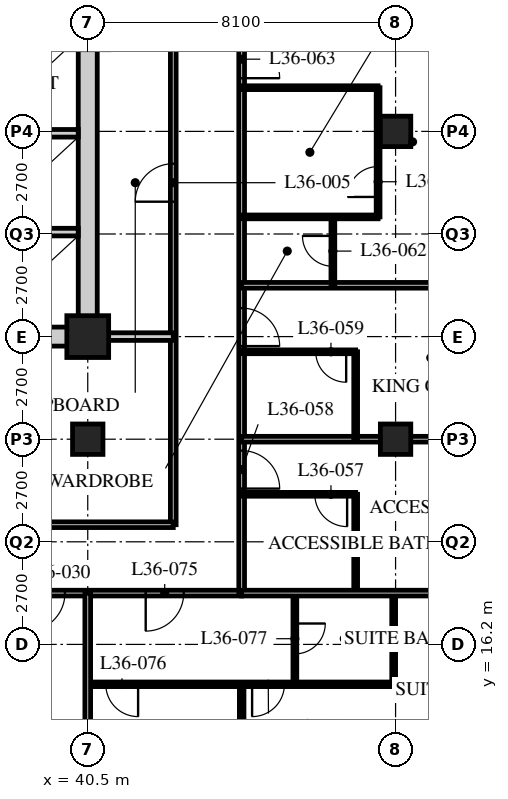
"""IFC4 building model, lengths in metres.
Left out: names, types, materials, properties, quantities, classifications, styles, units other than length and angle.
Written with IfcOpenShell. Run it as: python <this file> out.ifc"""

import sys

from ifc_helpers import new_model, si_unit, direction, frame, frame_2d, origin, origin_2d, place, context, subcontext, project, spatial, rectangle, hollow_rectangle, extrude, element, fill, save


model = new_model("IFC4")
c1 = context("Model", 3, precision=1e-05, world=origin(), true_north=direction((0.0, 1.0)))
c2 = subcontext(c1, "Body", "Model", "MODEL_VIEW")
j1 = project(units=[si_unit("LENGTHUNIT", "METRE"), si_unit("PLANEANGLEUNIT", "RADIAN")], contexts=[c1])
p1 = place(None, origin())
s1 = spatial("IfcSite", under=j1, at=p1, CompositionType="ELEMENT")
p2 = place(p1, origin())
s2 = spatial("IfcBuilding", under=s1, at=p2, CompositionType="ELEMENT")
p3 = place(p2, frame((0.0, 0.0, 140.8)))
s3 = spatial("IfcBuildingStorey", under=s2, at=p3, CompositionType="ELEMENT", Elevation=140.8)
p4 = place(p3, frame((40.5, 21.6, 0.0), z_axis=(0.0, 0.0, 1.0), x_axis=(1.0, 0.0, 0.0)))
e1 = element("IfcColumn", 1, at=p4, inside=s3, PredefinedType="COLUMN", context=c2, shape_type="SweptSolid", body=[
    extrude(hollow_rectangle(XDim=0.8, YDim=0.8, WallThickness=0.08, at=origin_2d()), origin(), (0.0, 0.0, 1.0), 3.4),
])
p5 = place(p3, frame((40.5, 24.3, 0.0), z_axis=(0.0, 0.0, 1.0), x_axis=(1.0, 0.0, 0.0)))
e2 = element("IfcColumn", 2, at=p5, inside=s3, PredefinedType="COLUMN", context=c2, shape_type="SweptSolid", body=[
    extrude(hollow_rectangle(XDim=1.1, YDim=1.1, WallThickness=0.1, at=origin_2d()), origin(), (0.0, 0.0, 1.0), 3.4),
])
for number, where, z_axis, x_axis in (
    (3, (48.6, 21.6, 0.0), (0.0, 0.0, 1.0), (1.0, 0.0, 0.0)),
    (4, (48.6, 29.7, 0.0), (0.0, 0.0, 1.0), (1.0, 0.0, 0.0)),
):
    element("IfcColumn", number, at=place(p3, frame(where, z_axis=z_axis, x_axis=x_axis)), inside=s3, PredefinedType="COLUMN", context=c2, shape_type="SweptSolid", body=[
        extrude(hollow_rectangle(XDim=0.8, YDim=0.8, WallThickness=0.08, at=origin_2d()), origin(), (0.0, 0.0, 1.0), 3.4),
    ])
p6 = place(p3, frame((8.1, 17.55, 0.0), z_axis=(0.0, 0.0, 1.0), x_axis=(1.0, 0.0, 0.0)))
e5 = element("IfcWall", 5, at=p6, inside=s3, PredefinedType="PARTITIONING", context=c2, shape_type="SweptSolid", body=[
    extrude(rectangle(XDim=36.45, YDim=0.15, at=frame_2d((18.225, 0.0))), origin(), (0.0, 0.0, 1.0), 3.19),
])
p7 = place(p6, frame((9.625, 0.0, 0.0)))
e6 = element("IfcOpeningElement", 6, at=p7, cuts=e5, PredefinedType="OPENING", context=c2, shape_type="SweptSolid", body=[
    extrude(rectangle(XDim=1.0, YDim=2.1, at=frame_2d((0.5, 1.05))), frame((0.0, 0.085, 0.0), z_axis=(0.0, -1.0, 0.0), x_axis=(1.0, 0.0, 0.0)), (0.0, 0.0, 1.0), 0.17),
])
p8 = place(p6, frame((18.1, 0.0, 0.0)))
e7 = element("IfcOpeningElement", 7, at=p8, cuts=e5, PredefinedType="OPENING", context=c2, shape_type="SweptSolid", body=[
    extrude(rectangle(XDim=1.0, YDim=2.1, at=frame_2d((0.5, 1.05))), frame((0.0, 0.085, 0.0), z_axis=(0.0, -1.0, 0.0), x_axis=(1.0, 0.0, 0.0)), (0.0, 0.0, 1.0), 0.17),
])
p9 = place(p6, frame((26.75, 0.0, 0.0)))
e8 = element("IfcOpeningElement", 8, at=p9, cuts=e5, PredefinedType="OPENING", context=c2, shape_type="SweptSolid", body=[
    extrude(rectangle(XDim=1.0, YDim=2.1, at=frame_2d((0.5, 1.05))), frame((0.0, 0.085, 0.0), z_axis=(0.0, -1.0, 0.0), x_axis=(1.0, 0.0, 0.0)), (0.0, 0.0, 1.0), 0.17),
])
p10 = place(p6, frame((30.8, 0.0, 0.0)))
e9 = element("IfcOpeningElement", 9, at=p10, cuts=e5, PredefinedType="OPENING", context=c2, shape_type="SweptSolid", body=[
    extrude(rectangle(XDim=1.0, YDim=2.1, at=frame_2d((0.5, 1.05))), frame((0.0, 0.085, 0.0), z_axis=(0.0, -1.0, 0.0), x_axis=(1.0, 0.0, 0.0)), (0.0, 0.0, 1.0), 0.17),
])
p11 = place(p6, frame((1.525, 0.0, 0.0)))
e10 = element("IfcOpeningElement", 10, at=p11, cuts=e5, PredefinedType="OPENING", context=c2, shape_type="SweptSolid", body=[
    extrude(rectangle(XDim=1.0, YDim=2.1, at=frame_2d((0.5, 1.05))), frame((0.0, 0.085, 0.0), z_axis=(0.0, -1.0, 0.0), x_axis=(1.0, 0.0, 0.0)), (0.0, 0.0, 1.0), 0.17),
])
p12 = place(p6, frame((33.925, 0.0, 0.0)))
e11 = element("IfcOpeningElement", 11, at=p12, cuts=e5, PredefinedType="OPENING", context=c2, shape_type="SweptSolid", body=[
    extrude(rectangle(XDim=1.0, YDim=2.1, at=frame_2d((0.5, 1.05))), frame((0.0, 0.085, 0.0), z_axis=(0.0, -1.0, 0.0), x_axis=(1.0, 0.0, 0.0)), (0.0, 0.0, 1.0), 0.17),
])
p13 = place(p3, frame((44.55, 17.55, 0.0), z_axis=(0.0, 0.0, 1.0), x_axis=(0.0, 1.0, 0.0)))
e12 = element("IfcWall", 12, at=p13, inside=s3, PredefinedType="PARTITIONING", context=c2, shape_type="SweptSolid", body=[
    extrude(rectangle(XDim=28.35, YDim=0.15, at=frame_2d((14.175, 0.0))), origin(), (0.0, 0.0, 1.0), 3.19),
])
p14 = place(p13, frame((2.75, 0.0, 0.0)))
e13 = element("IfcOpeningElement", 13, at=p14, cuts=e12, PredefinedType="OPENING", context=c2, shape_type="SweptSolid", body=[
    extrude(rectangle(XDim=1.0, YDim=2.1, at=frame_2d((0.5, 1.05))), frame((0.0, 0.085, 0.0), z_axis=(0.0, -1.0, 0.0), x_axis=(1.0, 0.0, 0.0)), (0.0, 0.0, 1.0), 0.17),
])
p15 = place(p13, frame((6.5, 0.0, 0.0)))
e14 = element("IfcOpeningElement", 14, at=p15, cuts=e12, PredefinedType="OPENING", context=c2, shape_type="SweptSolid", body=[
    extrude(rectangle(XDim=1.0, YDim=2.1, at=frame_2d((0.5, 1.05))), frame((0.0, 0.085, 0.0), z_axis=(0.0, -1.0, 0.0), x_axis=(1.0, 0.0, 0.0)), (0.0, 0.0, 1.0), 0.17),
])
p16 = place(p13, frame((13.55, 0.0, 0.0)))
e15 = element("IfcOpeningElement", 15, at=p16, cuts=e12, PredefinedType="OPENING", context=c2, shape_type="SweptSolid", body=[
    extrude(rectangle(XDim=1.0, YDim=2.1, at=frame_2d((0.5, 1.05))), frame((0.0, 0.085, 0.0), z_axis=(0.0, -1.0, 0.0), x_axis=(1.0, 0.0, 0.0)), (0.0, 0.0, 1.0), 0.17),
])
p17 = place(p13, frame((18.1, 0.0, 0.0)))
e16 = element("IfcOpeningElement", 16, at=p17, cuts=e12, PredefinedType="OPENING", context=c2, shape_type="SweptSolid", body=[
    extrude(rectangle(XDim=1.0, YDim=2.1, at=frame_2d((0.5, 1.05))), frame((0.0, 0.085, 0.0), z_axis=(0.0, -1.0, 0.0), x_axis=(1.0, 0.0, 0.0)), (0.0, 0.0, 1.0), 0.17),
])
p18 = place(p13, frame((26.75, 0.0, 0.0)))
e17 = element("IfcOpeningElement", 17, at=p18, cuts=e12, PredefinedType="OPENING", context=c2, shape_type="SweptSolid", body=[
    extrude(rectangle(XDim=1.0, YDim=2.1, at=frame_2d((0.5, 1.05))), frame((0.0, 0.085, 0.0), z_axis=(0.0, -1.0, 0.0), x_axis=(1.0, 0.0, 0.0)), (0.0, 0.0, 1.0), 0.17),
])
p19 = place(p3, frame((42.75, 19.35, 0.0), z_axis=(0.0, 0.0, 1.0), x_axis=(0.0, 1.0, 0.0)))
e18 = element("IfcWall", 18, at=p19, inside=s3, PredefinedType="PARTITIONING", context=c2, shape_type="SweptSolid", body=[
    extrude(rectangle(XDim=24.75, YDim=0.15, at=frame_2d((12.375, 0.0))), origin(), (0.0, 0.0, 1.0), 3.19),
])
p20 = place(p19, frame((8.5, 0.0, 0.0)))
e19 = element("IfcOpeningElement", 19, at=p20, cuts=e18, PredefinedType="OPENING", context=c2, shape_type="SweptSolid", body=[
    extrude(rectangle(XDim=1.0, YDim=2.1, at=frame_2d((0.5, 1.05))), frame((0.0, 0.085, 0.0), z_axis=(0.0, -1.0, 0.0), x_axis=(1.0, 0.0, 0.0)), (0.0, 0.0, 1.0), 0.17),
])
p21 = place(p19, frame((16.6, 0.0, 0.0)))
e20 = element("IfcOpeningElement", 20, at=p21, cuts=e18, PredefinedType="OPENING", context=c2, shape_type="SweptSolid", body=[
    extrude(rectangle(XDim=1.0, YDim=2.1, at=frame_2d((0.5, 1.05))), frame((0.0, 0.085, 0.0), z_axis=(0.0, -1.0, 0.0), x_axis=(1.0, 0.0, 0.0)), (0.0, 0.0, 1.0), 0.17),
])
p22 = place(p3, frame((29.56, 19.35, 0.0), z_axis=(0.0, 0.0, 1.0), x_axis=(1.0, 0.0, 0.0)))
e21 = element("IfcWall", 21, at=p22, inside=s3, PredefinedType="PARTITIONING", context=c2, shape_type="SweptSolid", body=[
    extrude(rectangle(XDim=13.19, YDim=0.15, at=frame_2d((6.595, 0.0))), origin(), (0.0, 0.0, 1.0), 3.19),
])
p23 = place(p22, frame((0.5, 0.0, 0.0)))
e22 = element("IfcOpeningElement", 22, at=p23, cuts=e21, PredefinedType="OPENING", context=c2, shape_type="SweptSolid", body=[
    extrude(rectangle(XDim=1.0, YDim=2.1, at=frame_2d((0.5, 1.05))), frame((0.0, 0.085, 0.0), z_axis=(0.0, -1.0, 0.0), x_axis=(1.0, 0.0, 0.0)), (0.0, 0.0, 1.0), 0.17),
])
p24 = place(p22, frame((7.1, 0.0, 0.0)))
e23 = element("IfcOpeningElement", 23, at=p24, cuts=e21, PredefinedType="OPENING", context=c2, shape_type="SweptSolid", body=[
    extrude(rectangle(XDim=1.0, YDim=2.1, at=frame_2d((0.5, 1.05))), frame((0.0, 0.085, 0.0), z_axis=(0.0, -1.0, 0.0), x_axis=(1.0, 0.0, 0.0)), (0.0, 0.0, 1.0), 0.17),
])
p25 = place(p3, frame((40.5, 24.3, 0.0), z_axis=(0.0, 0.0, 1.0), x_axis=(1.0, 0.0, 0.0)))
e24 = element("IfcWall", 24, at=p25, inside=s3, PredefinedType="SOLIDWALL", context=c2, shape_type="SweptSolid", body=[
    extrude(rectangle(XDim=2.25, YDim=0.2, at=frame_2d((1.125, 0.0))), origin(), (0.0, 0.0, 1.0), 3.19),
])
p26 = place(p3, frame((47.55, 17.55, 0.0), z_axis=(0.0, 0.0, 1.0), x_axis=(0.0, 1.0, 0.0)))
e25 = element("IfcWall", 25, at=p26, inside=s3, PredefinedType="PARTITIONING", context=c2, shape_type="SweptSolid", body=[
    extrude(rectangle(XDim=2.6, YDim=0.1, at=frame_2d((1.3, 0.0))), origin(), (0.0, 0.0, 1.0), 3.19),
])
p27 = place(p3, frame((44.55, 20.15, 0.0), z_axis=(0.0, 0.0, 1.0), x_axis=(1.0, 0.0, 0.0)))
e26 = element("IfcWall", 26, at=p27, inside=s3, PredefinedType="PARTITIONING", context=c2, shape_type="SweptSolid", body=[
    extrude(rectangle(XDim=3.0, YDim=0.1, at=frame_2d((1.5, 0.0))), origin(), (0.0, 0.0, 1.0), 3.19),
])
p28 = place(p27, frame((1.925, 0.0, 0.0)))
e27 = element("IfcOpeningElement", 27, at=p28, cuts=e26, PredefinedType="OPENING", context=c2, shape_type="SweptSolid", body=[
    extrude(rectangle(XDim=0.85, YDim=2.1, at=frame_2d((0.425, 1.05))), frame((0.0, 0.06, 0.0), z_axis=(0.0, -1.0, 0.0), x_axis=(1.0, 0.0, 0.0)), (0.0, 0.0, 1.0), 0.12),
])
p29 = place(p3, frame((44.55, 21.6, 0.0), z_axis=(0.0, 0.0, 1.0), x_axis=(1.0, 0.0, 0.0)))
e28 = element("IfcWall", 28, at=p29, inside=s3, PredefinedType="PARTITIONING", context=c2, shape_type="SweptSolid", body=[
    extrude(rectangle(XDim=11.85, YDim=0.15, at=frame_2d((5.925, 0.0))), origin(), (0.0, 0.0, 1.0), 2.578),
])
p30 = place(p3, frame((47.55, 21.6, 0.0), z_axis=(0.0, 0.0, 1.0), x_axis=(0.0, 1.0, 0.0)))
e29 = element("IfcWall", 29, at=p30, inside=s3, PredefinedType="PARTITIONING", context=c2, shape_type="SweptSolid", body=[
    extrude(rectangle(XDim=2.3, YDim=0.1, at=frame_2d((1.15, 0.0))), origin(), (0.0, 0.0, 1.0), 3.19),
])
p31 = place(p3, frame((44.55, 23.9, 0.0), z_axis=(0.0, 0.0, 1.0), x_axis=(1.0, 0.0, 0.0)))
e30 = element("IfcWall", 30, at=p31, inside=s3, PredefinedType="PARTITIONING", context=c2, shape_type="SweptSolid", body=[
    extrude(rectangle(XDim=3.0, YDim=0.1, at=frame_2d((1.5, 0.0))), origin(), (0.0, 0.0, 1.0), 3.19),
])
p32 = place(p31, frame((1.95, 0.0, 0.0)))
e31 = element("IfcOpeningElement", 31, at=p32, cuts=e30, PredefinedType="OPENING", context=c2, shape_type="SweptSolid", body=[
    extrude(rectangle(XDim=0.8, YDim=2.1, at=frame_2d((0.4, 1.05))), frame((0.0, 0.06, 0.0), z_axis=(0.0, -1.0, 0.0), x_axis=(1.0, 0.0, 0.0)), (0.0, 0.0, 1.0), 0.12),
])
p33 = place(p3, frame((44.55, 25.65, 0.0), z_axis=(0.0, 0.0, 1.0), x_axis=(1.0, 0.0, 0.0)))
e32 = element("IfcWall", 32, at=p33, inside=s3, PredefinedType="PARTITIONING", context=c2, shape_type="SweptSolid", body=[
    extrude(rectangle(XDim=11.85, YDim=0.15, at=frame_2d((5.925, 0.0))), origin(), (0.0, 0.0, 1.0), 3.19),
])
p34 = place(p3, frame((48.14, 27.45, 0.0), z_axis=(0.0, 0.0, 1.0), x_axis=(0.0, 1.0, 0.0)))
e33 = element("IfcWall", 33, at=p34, inside=s3, PredefinedType="PARTITIONING", context=c2, shape_type="SweptSolid", body=[
    extrude(rectangle(XDim=3.4, YDim=0.1, at=frame_2d((1.7, 0.0))), origin(), (0.0, 0.0, 1.0), 3.19),
])
p35 = place(p34, frame((0.525, 0.0, 0.0)))
e34 = element("IfcOpeningElement", 34, at=p35, cuts=e33, PredefinedType="OPENING", context=c2, shape_type="SweptSolid", body=[
    extrude(rectangle(XDim=0.8, YDim=2.1, at=frame_2d((0.4, 1.05))), frame((0.0, 0.06, 0.0), z_axis=(0.0, -1.0, 0.0), x_axis=(1.0, 0.0, 0.0)), (0.0, 0.0, 1.0), 0.12),
])
p36 = place(p3, frame((46.95, 25.65, 0.0), z_axis=(0.0, 0.0, 1.0), x_axis=(0.0, 1.0, 0.0)))
e35 = element("IfcWall", 35, at=p36, inside=s3, PredefinedType="PARTITIONING", context=c2, shape_type="SweptSolid", body=[
    extrude(rectangle(XDim=1.8, YDim=0.1, at=frame_2d((0.9, 0.0))), origin(), (0.0, 0.0, 1.0), 3.19),
])
p37 = place(p36, frame((0.5, 0.0, 0.0)))
e36 = element("IfcOpeningElement", 36, at=p37, cuts=e35, PredefinedType="OPENING", context=c2, shape_type="SweptSolid", body=[
    extrude(rectangle(XDim=0.8, YDim=2.1, at=frame_2d((0.4, 1.05))), frame((0.0, 0.06, 0.0), z_axis=(0.0, -1.0, 0.0), x_axis=(1.0, 0.0, 0.0)), (0.0, 0.0, 1.0), 0.12),
])
for number, where, z_axis, x_axis in (
    (37, (44.55, 27.45, 0.0), (0.0, 0.0, 1.0), (1.0, 0.0, 0.0)),
    (38, (44.55, 30.85, 0.0), (0.0, 0.0, 1.0), (1.0, 0.0, 0.0)),
):
    element("IfcWall", number, at=place(p3, frame(where, z_axis=z_axis, x_axis=x_axis)), inside=s3, PredefinedType="PARTITIONING", context=c2, shape_type="SweptSolid", body=[
        extrude(rectangle(XDim=3.59, YDim=0.1, at=frame_2d((1.795, 0.0))), origin(), (0.0, 0.0, 1.0), 3.19),
    ])
p38 = place(p3, frame((40.5, 15.15, 0.0), z_axis=(0.0, 0.0, 1.0), x_axis=(1.0, 0.0, 0.0)))
e39 = element("IfcWall", 39, at=p38, inside=s3, PredefinedType="PARTITIONING", context=c2, shape_type="SweptSolid", body=[
    extrude(rectangle(XDim=8.05, YDim=0.12, at=frame_2d((4.025, 0.0))), origin(), (0.0, 0.0, 1.0), 3.19),
])
p39 = place(p38, frame((0.475, 0.0, 0.0)))
e40 = element("IfcOpeningElement", 40, at=p39, cuts=e39, PredefinedType="OPENING", context=c2, shape_type="SweptSolid", body=[
    extrude(rectangle(XDim=0.85, YDim=2.1, at=frame_2d((0.425, 1.05))), frame((0.0, 0.07, 0.0), z_axis=(0.0, -1.0, 0.0), x_axis=(1.0, 0.0, 0.0)), (0.0, 0.0, 1.0), 0.14),
])
p40 = place(p38, frame((4.325, 0.0, 0.0)))
e41 = element("IfcOpeningElement", 41, at=p40, cuts=e39, PredefinedType="OPENING", context=c2, shape_type="SweptSolid", body=[
    extrude(rectangle(XDim=0.85, YDim=2.1, at=frame_2d((0.425, 1.05))), frame((0.0, 0.07, 0.0), z_axis=(0.0, -1.0, 0.0), x_axis=(1.0, 0.0, 0.0)), (0.0, 0.0, 1.0), 0.14),
])
p41 = place(p3, frame((45.95, 17.55, 0.0), z_axis=(0.0, 0.0, 1.0), x_axis=(0.0, -1.0, 0.0)))
e42 = element("IfcWall", 42, at=p41, inside=s3, PredefinedType="PARTITIONING", context=c2, shape_type="SweptSolid", body=[
    extrude(rectangle(XDim=2.4, YDim=0.1, at=frame_2d((1.2, 0.0))), origin(), (0.0, 0.0, 1.0), 3.19),
])
p42 = place(p41, frame((0.8, 0.0, 0.0)))
e43 = element("IfcOpeningElement", 43, at=p42, cuts=e42, PredefinedType="OPENING", context=c2, shape_type="SweptSolid", body=[
    extrude(rectangle(XDim=0.8, YDim=2.1, at=frame_2d((0.4, 1.05))), frame((0.0, 0.06, 0.0), z_axis=(0.0, -1.0, 0.0), x_axis=(1.0, 0.0, 0.0)), (0.0, 0.0, 1.0), 0.12),
])
p43 = place(p3, frame((48.55, 17.55, 0.0), z_axis=(0.0, 0.0, 1.0), x_axis=(0.0, -1.0, 0.0)))
e44 = element("IfcWall", 44, at=p43, inside=s3, PredefinedType="PARTITIONING", context=c2, shape_type="SweptSolid", body=[
    extrude(rectangle(XDim=2.4, YDim=0.1, at=frame_2d((1.2, 0.0))), origin(), (0.0, 0.0, 1.0), 2.578),
])
p44 = place(p3, frame((44.55, 15.15, 0.0), z_axis=(0.0, 0.0, 1.0), x_axis=(0.0, -1.0, 0.0)))
e45 = element("IfcWall", 45, at=p44, inside=s3, PredefinedType="PARTITIONING", context=c2, shape_type="SweptSolid", body=[
    extrude(rectangle(XDim=9.45, YDim=0.12, at=frame_2d((4.725, 0.0))), origin(), (0.0, 0.0, 1.0), 3.19),
])
p45 = place(p3, frame((44.55, 17.55, 0.0), z_axis=(0.0, 0.0, 1.0), x_axis=(1.0, 0.0, 0.0)))
e46 = element("IfcWall", 46, at=p45, inside=s3, PredefinedType="PARTITIONING", context=c2, shape_type="SweptSolid", body=[
    extrude(rectangle(XDim=11.85, YDim=0.15, at=frame_2d((5.925, 0.0))), origin(), (0.0, 0.0, 1.0), 3.19),
])
p46 = place(p3, frame((40.5, 17.55, 0.0), z_axis=(0.0, 0.0, 1.0), x_axis=(0.0, -1.0, 0.0)))
e47 = element("IfcWall", 47, at=p46, inside=s3, PredefinedType="PARTITIONING", context=c2, shape_type="SweptSolid", body=[
    extrude(rectangle(XDim=11.85, YDim=0.15, at=frame_2d((5.925, 0.0))), origin(), (0.0, 0.0, 1.0), 2.578),
])
p47 = place(p3, frame((15.95, 24.3, 0.0), z_axis=(0.0, 0.0, 1.0), x_axis=(1.0, 0.0, 0.0)))
e48 = element("IfcWall", 48, at=p47, inside=s3, PredefinedType="SOLIDWALL", context=c2, shape_type="SweptSolid", body=[
    extrude(rectangle(XDim=24.8, YDim=0.5, at=frame_2d((12.4, 0.0))), origin(), (0.0, 0.0, 1.0), 2.54),
])
p48 = place(p47, frame((11.5, 0.0, 0.0)))
e49 = element("IfcOpeningElement", 49, at=p48, cuts=e48, PredefinedType="OPENING", context=c2, shape_type="SweptSolid", body=[
    extrude(rectangle(XDim=1.8, YDim=2.4, at=frame_2d((0.9, 1.2))), frame((0.0, 0.26, 0.0), z_axis=(0.0, -1.0, 0.0), x_axis=(1.0, 0.0, 0.0)), (0.0, 0.0, 1.0), 0.52),
])
p49 = place(p3, frame((40.5, 24.55, 0.0), z_axis=(0.0, 0.0, 1.0), x_axis=(0.0, 1.0, 0.0)))
e50 = element("IfcWall", 50, at=p49, inside=s3, PredefinedType="SOLIDWALL", context=c2, shape_type="SweptSolid", body=[
    extrude(rectangle(XDim=15.7, YDim=0.5, at=frame_2d((7.85, 0.0))), origin(), (0.0, 0.0, 1.0), 2.578),
])
for number, where, z_axis, x_axis in (
    (51, (37.65, 27.05, 0.0), (0.0, 0.0, 1.0), (1.0, 0.0, 0.0)),
    (52, (37.65, 29.65, 0.0), (0.0, 0.0, 1.0), (1.0, 0.0, 0.0)),
):
    element("IfcWall", number, at=place(p3, frame(where, z_axis=z_axis, x_axis=x_axis)), inside=s3, PredefinedType="SOLIDWALL", context=c2, shape_type="SweptSolid", body=[
        extrude(rectangle(XDim=2.6, YDim=0.2, at=frame_2d((1.3, 0.0))), origin(), (0.0, 0.0, 1.0), 3.19),
    ])
p50 = place(p20, origin())
e53 = element("IfcDoor", 53, at=p50, inside=s3, OperationType="SINGLE_SWING_LEFT", PredefinedType="DOOR", context=c2, shape_type="SweptSolid", body=[
    extrude(rectangle(XDim=1.0, YDim=2.1, at=frame_2d((0.5, 1.05))), frame((0.0, 0.025, 0.0), z_axis=(0.0, -1.0, 0.0), x_axis=(1.0, 0.0, 0.0)), (0.0, 0.0, 1.0), 0.05),
])
fill(e19, e53)
p51 = place(p10, origin())
e54 = element("IfcDoor", 54, at=p51, inside=s3, OperationType="SINGLE_SWING_RIGHT", PredefinedType="DOOR", context=c2, shape_type="SweptSolid", body=[
    extrude(rectangle(XDim=1.0, YDim=2.1, at=frame_2d((0.5, 1.05))), frame((0.0, 0.025, 0.0), z_axis=(0.0, -1.0, 0.0), x_axis=(1.0, 0.0, 0.0)), (0.0, 0.0, 1.0), 0.05),
])
fill(e9, e54)
p52 = place(p28, origin())
e55 = element("IfcDoor", 55, at=p52, inside=s3, OperationType="SINGLE_SWING_LEFT", PredefinedType="DOOR", context=c2, shape_type="SweptSolid", body=[
    extrude(rectangle(XDim=0.85, YDim=2.1, at=frame_2d((0.425, 1.05))), frame((0.0, 0.025, 0.0), z_axis=(0.0, -1.0, 0.0), x_axis=(1.0, 0.0, 0.0)), (0.0, 0.0, 1.0), 0.05),
])
fill(e27, e55)
p53 = place(p14, origin())
e56 = element("IfcDoor", 56, at=p53, inside=s3, OperationType="SINGLE_SWING_RIGHT", PredefinedType="DOOR", context=c2, shape_type="SweptSolid", body=[
    extrude(rectangle(XDim=1.0, YDim=2.1, at=frame_2d((0.5, 1.05))), frame((0.0, 0.025, 0.0), z_axis=(0.0, -1.0, 0.0), x_axis=(1.0, 0.0, 0.0)), (0.0, 0.0, 1.0), 0.05),
])
fill(e13, e56)
p54 = place(p32, origin())
e57 = element("IfcDoor", 57, at=p54, inside=s3, OperationType="SINGLE_SWING_LEFT", PredefinedType="DOOR", context=c2, shape_type="SweptSolid", body=[
    extrude(rectangle(XDim=0.8, YDim=2.1, at=frame_2d((0.4, 1.05))), frame((0.0, 0.025, 0.0), z_axis=(0.0, -1.0, 0.0), x_axis=(1.0, 0.0, 0.0)), (0.0, 0.0, 1.0), 0.05),
])
fill(e31, e57)
p55 = place(p15, origin())
e58 = element("IfcDoor", 58, at=p55, inside=s3, OperationType="SINGLE_SWING_RIGHT", PredefinedType="DOOR", context=c2, shape_type="SweptSolid", body=[
    extrude(rectangle(XDim=1.0, YDim=2.1, at=frame_2d((0.5, 1.05))), frame((0.0, 0.025, 0.0), z_axis=(0.0, -1.0, 0.0), x_axis=(1.0, 0.0, 0.0)), (0.0, 0.0, 1.0), 0.05),
])
fill(e14, e58)
p56 = place(p35, origin())
e59 = element("IfcDoor", 59, at=p56, inside=s3, OperationType="SINGLE_SWING_LEFT", PredefinedType="DOOR", context=c2, shape_type="SweptSolid", body=[
    extrude(rectangle(XDim=0.8, YDim=2.1, at=frame_2d((0.4, 1.05))), frame((0.0, 0.025, 0.0), z_axis=(0.0, -1.0, 0.0), x_axis=(1.0, 0.0, 0.0)), (0.0, 0.0, 1.0), 0.05),
])
fill(e34, e59)
p57 = place(p37, origin())
e60 = element("IfcDoor", 60, at=p57, inside=s3, OperationType="SINGLE_SWING_RIGHT", PredefinedType="DOOR", context=c2, shape_type="SweptSolid", body=[
    extrude(rectangle(XDim=0.8, YDim=2.1, at=frame_2d((0.4, 1.05))), frame((0.0, 0.025, 0.0), z_axis=(0.0, -1.0, 0.0), x_axis=(1.0, 0.0, 0.0)), (0.0, 0.0, 1.0), 0.05),
])
fill(e36, e60)
p58 = place(p16, origin())
e61 = element("IfcDoor", 61, at=p58, inside=s3, OperationType="SINGLE_SWING_RIGHT", PredefinedType="DOOR", context=c2, shape_type="SweptSolid", body=[
    extrude(rectangle(XDim=1.0, YDim=2.1, at=frame_2d((0.5, 1.05))), frame((0.0, 0.025, 0.0), z_axis=(0.0, -1.0, 0.0), x_axis=(1.0, 0.0, 0.0)), (0.0, 0.0, 1.0), 0.05),
])
fill(e15, e61)
p59 = place(p12, origin())
e62 = element("IfcDoor", 62, at=p59, inside=s3, OperationType="SINGLE_SWING_RIGHT", PredefinedType="DOOR", context=c2, shape_type="SweptSolid", body=[
    extrude(rectangle(XDim=1.0, YDim=2.1, at=frame_2d((0.5, 1.05))), frame((0.0, 0.025, 0.0), z_axis=(0.0, -1.0, 0.0), x_axis=(1.0, 0.0, 0.0)), (0.0, 0.0, 1.0), 0.05),
])
fill(e11, e62)
p60 = place(p39, origin())
e63 = element("IfcDoor", 63, at=p60, inside=s3, OperationType="SINGLE_SWING_LEFT", PredefinedType="DOOR", context=c2, shape_type="SweptSolid", body=[
    extrude(rectangle(XDim=0.85, YDim=2.1, at=frame_2d((0.425, 1.05))), frame((0.0, 0.025, 0.0), z_axis=(0.0, -1.0, 0.0), x_axis=(1.0, 0.0, 0.0)), (0.0, 0.0, 1.0), 0.05),
])
fill(e40, e63)
p61 = place(p42, origin())
e64 = element("IfcDoor", 64, at=p61, inside=s3, OperationType="SINGLE_SWING_LEFT", PredefinedType="DOOR", context=c2, shape_type="SweptSolid", body=[
    extrude(rectangle(XDim=0.8, YDim=2.1, at=frame_2d((0.4, 1.05))), frame((0.0, 0.025, 0.0), z_axis=(0.0, -1.0, 0.0), x_axis=(1.0, 0.0, 0.0)), (0.0, 0.0, 1.0), 0.05),
])
fill(e43, e64)
p62 = place(p40, origin())
e65 = element("IfcDoor", 65, at=p62, inside=s3, OperationType="SINGLE_SWING_RIGHT", PredefinedType="DOOR", context=c2, shape_type="SweptSolid", body=[
    extrude(rectangle(XDim=0.85, YDim=2.1, at=frame_2d((0.425, 1.05))), frame((0.0, 0.025, 0.0), z_axis=(0.0, -1.0, 0.0), x_axis=(1.0, 0.0, 0.0)), (0.0, 0.0, 1.0), 0.05),
])
fill(e41, e65)
save(model, sys.argv[1])
